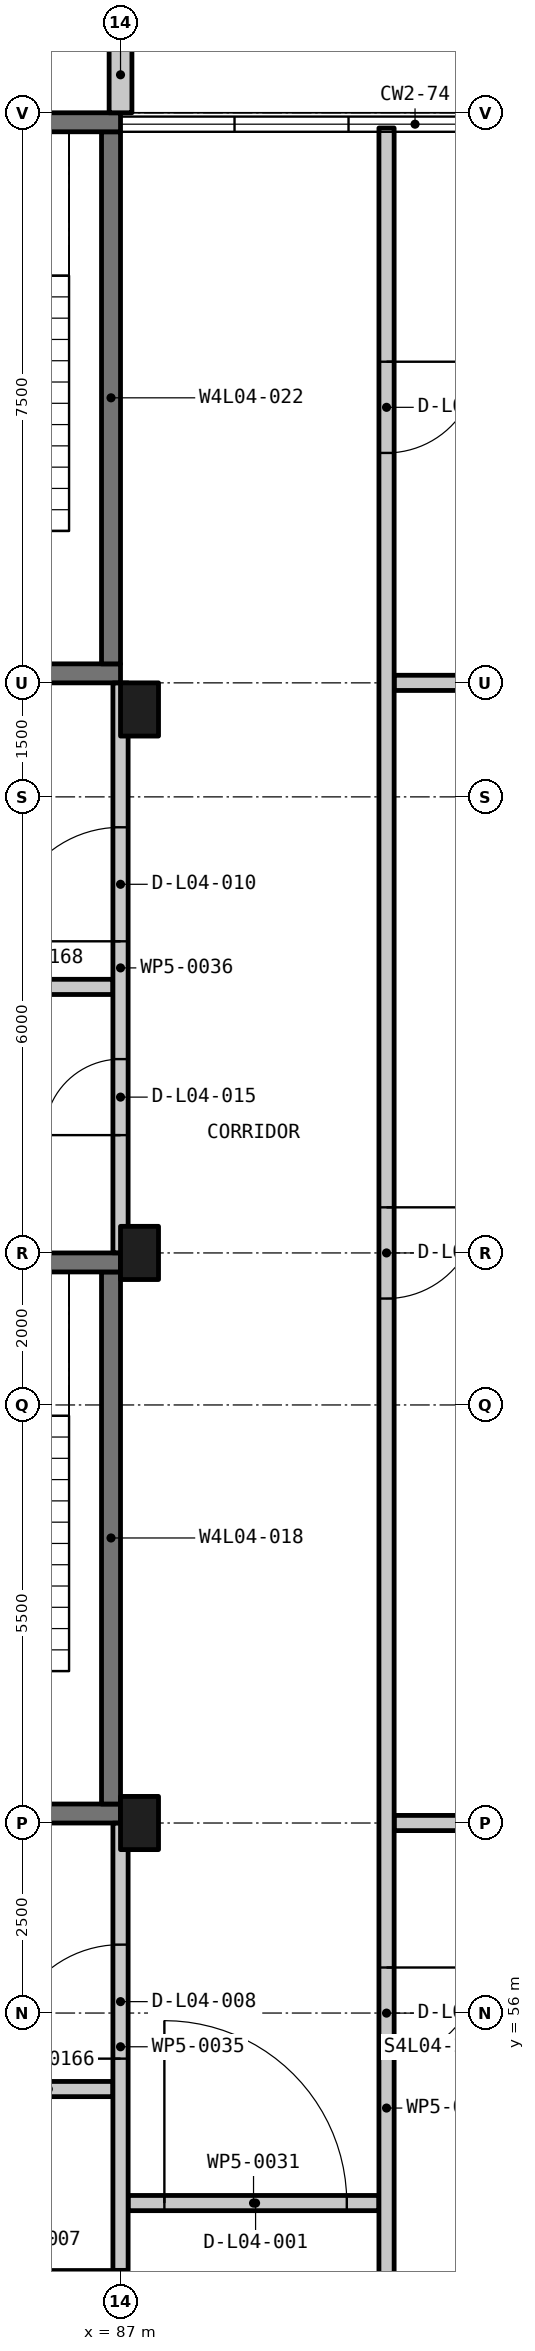
"""IFC4 building model, lengths in metres.
Left out: names, types, materials, properties, quantities, classifications, styles, units other than length and angle.
Written with IfcOpenShell. Run it as: python <this file> out.ifc"""

import sys

from ifc_helpers import new_model, si_unit, direction, frame, frame_2d, origin, origin_2d, place, context, subcontext, project, spatial, rectangle, extrude, element, fill, save


model = new_model("IFC4")
c1 = context("Model", 3, precision=1e-05, world=origin(), true_north=direction((0.0, 1.0)))
c2 = subcontext(c1, "Body", "Model", "MODEL_VIEW")
j1 = project(units=[si_unit("LENGTHUNIT", "METRE"), si_unit("PLANEANGLEUNIT", "RADIAN")], contexts=[c1])
p1 = place(None, origin())
s1 = spatial("IfcSite", under=j1, at=p1, CompositionType="ELEMENT")
p2 = place(p1, origin())
s2 = spatial("IfcBuilding", under=s1, at=p2, CompositionType="ELEMENT")
p3 = place(p2, frame((0.0, 0.0, 20.25)))
s3 = spatial("IfcBuildingStorey", under=s2, at=p3, CompositionType="ELEMENT", Elevation=20.25)
for number, where, z_axis, x_axis in (
    (1, (87.25, 58.5, -0.3), (0.0, 0.0, 1.0), (1.0, 0.0, 0.0)),
    (2, (87.25, 66.0, -0.3), (0.0, 0.0, 1.0), (1.0, 0.0, 0.0)),
    (3, (87.25, 73.15, -0.3), (0.0, 0.0, 1.0), (1.0, 0.0, 0.0)),
):
    element("IfcColumn", number, at=place(p3, frame(where, z_axis=z_axis, x_axis=x_axis)), inside=s3, PredefinedType="COLUMN", context=c2, shape_type="SweptSolid", body=[
        extrude(rectangle(XDim=0.5, YDim=0.7, at=origin_2d()), origin(), (0.0, 0.0, 1.0), 4.5),
    ])
p4 = place(p3, frame((84.577, 52.488, -0.3), z_axis=(0.0, 0.0, 1.0), x_axis=(1.0, 0.0, 0.0)))
e4 = element("IfcWall", 4, at=p4, inside=s3, PredefinedType="SHEAR", context=c2, shape_type="SweptSolid", body=[
    extrude(rectangle(XDim=2.425, YDim=0.25, at=frame_2d((1.212, 0.0))), origin(), (0.0, 0.0, 1.0), 4.5),
])
p5 = place(p3, frame((82.0, 58.625, -0.3), z_axis=(0.0, 0.0, 1.0), x_axis=(1.0, 0.0, 0.0)))
e5 = element("IfcWall", 5, at=p5, inside=s3, PredefinedType="SHEAR", context=c2, shape_type="SweptSolid", body=[
    extrude(rectangle(XDim=5.0, YDim=0.25, at=frame_2d((2.5, 0.0))), origin(), (0.0, 0.0, 1.0), 4.5),
])
p6 = place(p5, frame((1.9, 0.0, 0.3)))
e6 = element("IfcOpeningElement", 6, at=p6, cuts=e5, PredefinedType="OPENING", context=c2, shape_type="SweptSolid", body=[
    extrude(rectangle(XDim=1.2, YDim=2.2, at=frame_2d((0.6, 1.1))), frame((0.0, 0.135, 0.0), z_axis=(0.0, -1.0, 0.0), x_axis=(1.0, 0.0, 0.0)), (0.0, 0.0, 1.0), 0.27),
])
p7 = place(p3, frame((86.875, 58.75, -0.3), z_axis=(0.0, 0.0, 1.0), x_axis=(0.0, 1.0, 0.0)))
e7 = element("IfcWall", 7, at=p7, inside=s3, PredefinedType="SHEAR", context=c2, shape_type="SweptSolid", body=[
    extrude(rectangle(XDim=7.0, YDim=0.25, at=frame_2d((3.5, 0.0))), origin(), (0.0, 0.0, 1.0), 4.5),
])
p8 = place(p3, frame((82.0, 65.875, -0.3), z_axis=(0.0, 0.0, 1.0), x_axis=(1.0, 0.0, 0.0)))
e8 = element("IfcWall", 8, at=p8, inside=s3, PredefinedType="SHEAR", context=c2, shape_type="SweptSolid", body=[
    extrude(rectangle(XDim=5.0, YDim=0.25, at=frame_2d((2.5, 0.0))), origin(), (0.0, 0.0, 1.0), 4.5),
])
p9 = place(p3, frame((82.0, 73.625, -0.3), z_axis=(0.0, 0.0, 1.0), x_axis=(1.0, 0.0, 0.0)))
e9 = element("IfcWall", 9, at=p9, inside=s3, PredefinedType="SHEAR", context=c2, shape_type="SweptSolid", body=[
    extrude(rectangle(XDim=5.0, YDim=0.25, at=frame_2d((2.5, 0.0))), origin(), (0.0, 0.0, 1.0), 4.5),
])
p10 = place(p9, frame((1.9, 0.0, 0.3)))
e10 = element("IfcOpeningElement", 10, at=p10, cuts=e9, PredefinedType="OPENING", context=c2, shape_type="SweptSolid", body=[
    extrude(rectangle(XDim=1.2, YDim=2.2, at=frame_2d((0.6, 1.1))), frame((0.0, 0.135, 0.0), z_axis=(0.0, -1.0, 0.0), x_axis=(1.0, 0.0, 0.0)), (0.0, 0.0, 1.0), 0.27),
])
p11 = place(p3, frame((86.875, 73.75, -0.3), z_axis=(0.0, 0.0, 1.0), x_axis=(0.0, 1.0, 0.0)))
e11 = element("IfcWall", 11, at=p11, inside=s3, PredefinedType="SHEAR", context=c2, shape_type="SweptSolid", body=[
    extrude(rectangle(XDim=7.0, YDim=0.25, at=frame_2d((3.5, 0.0))), origin(), (0.0, 0.0, 1.0), 4.5),
])
p12 = place(p3, frame((82.0, 80.875, -0.3), z_axis=(0.0, 0.0, 1.0), x_axis=(1.0, 0.0, 0.0)))
e12 = element("IfcWall", 12, at=p12, inside=s3, PredefinedType="SHEAR", context=c2, shape_type="SweptSolid", body=[
    extrude(rectangle(XDim=5.0, YDim=0.25, at=frame_2d((2.5, 0.0))), origin(), (0.0, 0.0, 1.0), 4.5),
])
p13 = place(p3, frame((87.0, 81.0, 0.0), z_axis=(0.0, 0.0, 1.0), x_axis=(0.0, 1.0, 0.0)))
e13 = element("IfcWall", 13, at=p13, inside=s3, PredefinedType="SOLIDWALL", context=c2, shape_type="SweptSolid", body=[
    extrude(rectangle(XDim=1.0, YDim=0.3, at=frame_2d((0.5, 0.0))), origin(), (0.0, 0.0, 1.0), 4.5),
])
p14 = place(p3, frame((87.1, 53.5, 0.0), z_axis=(0.0, 0.0, 1.0), x_axis=(1.0, 0.0, 0.0)))
e14 = element("IfcWall", 14, at=p14, inside=s3, PredefinedType="PARTITIONING", context=c2, shape_type="SweptSolid", body=[
    extrude(rectangle(XDim=3.3, YDim=0.2, at=frame_2d((1.65, 0.0))), origin(), (0.0, 0.0, 1.0), 3.4),
])
p15 = place(p14, frame((0.477, 0.0, 0.0)))
e15 = element("IfcOpeningElement", 15, at=p15, cuts=e14, PredefinedType="OPENING", context=c2, shape_type="SweptSolid", body=[
    extrude(rectangle(XDim=2.4, YDim=2.1, at=frame_2d((1.2, 1.05))), frame((0.0, 0.11, 0.0), z_axis=(0.0, -1.0, 0.0), x_axis=(1.0, 0.0, 0.0)), (0.0, 0.0, 1.0), 0.22),
])
p16 = place(p3, frame((85.2, 55.0, 0.0), z_axis=(0.0, 0.0, 1.0), x_axis=(1.0, 0.0, 0.0)))
e16 = element("IfcWall", 16, at=p16, inside=s3, PredefinedType="PARTITIONING", context=c2, shape_type="SweptSolid", body=[
    extrude(rectangle(XDim=1.7, YDim=0.2, at=frame_2d((0.85, 0.0))), origin(), (0.0, 0.0, 1.0), 3.6),
])
p17 = place(p3, frame((90.6, 58.5, 0.0), z_axis=(0.0, 0.0, 1.0), x_axis=(1.0, 0.0, 0.0)))
e17 = element("IfcWall", 17, at=p17, inside=s3, PredefinedType="PARTITIONING", context=c2, shape_type="SweptSolid", body=[
    extrude(rectangle(XDim=13.2, YDim=0.2, at=frame_2d((6.6, 0.0))), origin(), (0.0, 0.0, 1.0), 3.3),
])
p18 = place(p3, frame((84.9, 69.5, 0.0), z_axis=(0.0, 0.0, 1.0), x_axis=(1.0, 0.0, 0.0)))
e18 = element("IfcWall", 18, at=p18, inside=s3, PredefinedType="PARTITIONING", context=c2, shape_type="SweptSolid", body=[
    extrude(rectangle(XDim=2.0, YDim=0.2, at=frame_2d((1.0, 0.0))), origin(), (0.0, 0.0, 1.0), 3.6),
])
p19 = place(p3, frame((90.6, 73.5, 0.0), z_axis=(0.0, 0.0, 1.0), x_axis=(1.0, 0.0, 0.0)))
e19 = element("IfcWall", 19, at=p19, inside=s3, PredefinedType="PARTITIONING", context=c2, shape_type="SweptSolid", body=[
    extrude(rectangle(XDim=12.998, YDim=0.2, at=frame_2d((6.499, 0.0))), origin(), (0.0, 0.0, 1.0), 3.4),
])
p20 = place(p3, frame((90.5, 80.8, 0.0), z_axis=(0.0, 0.0, 1.0), x_axis=(0.0, -1.0, 0.0)))
e20 = element("IfcWall", 20, at=p20, inside=s3, PredefinedType="PARTITIONING", context=c2, shape_type="SweptSolid", body=[
    extrude(rectangle(XDim=52.1, YDim=0.2, at=frame_2d((26.05, 0.0))), origin(), (0.0, 0.0, 1.0), 3.3),
])
p21 = place(p20, frame((47.85, 0.0, 0.0)))
e21 = element("IfcOpeningElement", 21, at=p21, cuts=e20, PredefinedType="OPENING", context=c2, shape_type="SweptSolid", body=[
    extrude(rectangle(XDim=1.2, YDim=2.1, at=frame_2d((0.6, 1.05))), frame((0.0, 0.11, 0.0), z_axis=(0.0, -1.0, 0.0), x_axis=(1.0, 0.0, 0.0)), (0.0, 0.0, 1.0), 0.22),
])
p22 = place(p20, frame((38.949, 0.0, 0.0)))
e22 = element("IfcOpeningElement", 22, at=p22, cuts=e20, PredefinedType="OPENING", context=c2, shape_type="SweptSolid", body=[
    extrude(rectangle(XDim=1.2, YDim=2.1, at=frame_2d((0.6, 1.05))), frame((0.0, 0.11, 0.0), z_axis=(0.0, -1.0, 0.0), x_axis=(1.0, 0.0, 0.0)), (0.0, 0.0, 1.0), 0.22),
])
p23 = place(p20, frame((24.201, 0.0, 0.0)))
e23 = element("IfcOpeningElement", 23, at=p23, cuts=e20, PredefinedType="OPENING", context=c2, shape_type="SweptSolid", body=[
    extrude(rectangle(XDim=1.2, YDim=2.1, at=frame_2d((0.6, 1.05))), frame((0.0, 0.11, 0.0), z_axis=(0.0, -1.0, 0.0), x_axis=(1.0, 0.0, 0.0)), (0.0, 0.0, 1.0), 0.22),
])
p24 = place(p20, frame((14.2, 0.0, 0.0)))
e24 = element("IfcOpeningElement", 24, at=p24, cuts=e20, PredefinedType="OPENING", context=c2, shape_type="SweptSolid", body=[
    extrude(rectangle(XDim=1.2, YDim=2.1, at=frame_2d((0.6, 1.05))), frame((0.0, 0.11, 0.0), z_axis=(0.0, -1.0, 0.0), x_axis=(1.0, 0.0, 0.0)), (0.0, 0.0, 1.0), 0.22),
])
p25 = place(p20, frame((3.075, 0.0, 0.0)))
e25 = element("IfcOpeningElement", 25, at=p25, cuts=e20, PredefinedType="OPENING", context=c2, shape_type="SweptSolid", body=[
    extrude(rectangle(XDim=1.2, YDim=2.1, at=frame_2d((0.6, 1.05))), frame((0.0, 0.11, 0.0), z_axis=(0.0, -1.0, 0.0), x_axis=(1.0, 0.0, 0.0)), (0.0, 0.0, 1.0), 0.22),
])
p26 = place(p3, frame((87.0, 52.615, 0.0), z_axis=(0.0, 0.0, 1.0), x_axis=(0.0, 1.0, 0.0)))
e26 = element("IfcWall", 26, at=p26, inside=s3, PredefinedType="PARTITIONING", context=c2, shape_type="SweptSolid", body=[
    extrude(rectangle(XDim=5.884, YDim=0.2, at=frame_2d((2.942, 0.0))), origin(), (0.0, 0.0, 1.0), 3.4),
])
p27 = place(p26, frame((2.785, 0.0, 0.0)))
e27 = element("IfcOpeningElement", 27, at=p27, cuts=e26, PredefinedType="OPENING", context=c2, shape_type="SweptSolid", body=[
    extrude(rectangle(XDim=1.5, YDim=2.1, at=frame_2d((0.75, 1.05))), frame((0.0, 0.11, 0.0), z_axis=(0.0, -1.0, 0.0), x_axis=(1.0, 0.0, 0.0)), (0.0, 0.0, 1.0), 0.22),
])
p28 = place(p3, frame((87.0, 66.002, 0.0), z_axis=(0.0, 0.0, 1.0), x_axis=(0.0, 1.0, 0.0)))
e28 = element("IfcWall", 28, at=p28, inside=s3, PredefinedType="PARTITIONING", context=c2, shape_type="SweptSolid", body=[
    extrude(rectangle(XDim=7.496, YDim=0.2, at=frame_2d((3.748, 0.0))), origin(), (0.0, 0.0, 1.0), 3.4),
])
p29 = place(p28, frame((4.098, 0.0, 0.0)))
e29 = element("IfcOpeningElement", 29, at=p29, cuts=e28, PredefinedType="OPENING", context=c2, shape_type="SweptSolid", body=[
    extrude(rectangle(XDim=1.5, YDim=2.1, at=frame_2d((0.75, 1.05))), frame((0.0, 0.11, 0.0), z_axis=(0.0, -1.0, 0.0), x_axis=(1.0, 0.0, 0.0)), (0.0, 0.0, 1.0), 0.22),
])
p30 = place(p28, frame((1.548, 0.0, 0.0)))
e30 = element("IfcOpeningElement", 30, at=p30, cuts=e28, PredefinedType="OPENING", context=c2, shape_type="SweptSolid", body=[
    extrude(rectangle(XDim=1.0, YDim=2.1, at=frame_2d((0.5, 1.05))), frame((0.0, 0.11, 0.0), z_axis=(0.0, -1.0, 0.0), x_axis=(1.0, 0.0, 0.0)), (0.0, 0.0, 1.0), 0.22),
])
p31 = place(p15, origin())
e31 = element("IfcDoor", 31, at=p31, inside=s3, OperationType="DOUBLE_DOOR_SINGLE_SWING", PredefinedType="DOOR", context=c2, shape_type="SweptSolid", body=[
    extrude(rectangle(XDim=2.4, YDim=2.1, at=frame_2d((1.2, 1.05))), frame((0.0, 0.025, 0.0), z_axis=(0.0, -1.0, 0.0), x_axis=(1.0, 0.0, 0.0)), (0.0, 0.0, 1.0), 0.05),
])
fill(e15, e31)
p32 = place(p27, origin())
e32 = element("IfcDoor", 32, at=p32, inside=s3, OperationType="DOUBLE_DOOR_SINGLE_SWING", PredefinedType="DOOR", context=c2, shape_type="SweptSolid", body=[
    extrude(rectangle(XDim=1.5, YDim=2.1, at=frame_2d((0.75, 1.05))), frame((0.0, 0.025, 0.0), z_axis=(0.0, -1.0, 0.0), x_axis=(1.0, 0.0, 0.0)), (0.0, 0.0, 1.0), 0.05),
])
fill(e27, e32)
p33 = place(p29, origin())
e33 = element("IfcDoor", 33, at=p33, inside=s3, OperationType="DOUBLE_DOOR_SINGLE_SWING", PredefinedType="DOOR", context=c2, shape_type="SweptSolid", body=[
    extrude(rectangle(XDim=1.5, YDim=2.1, at=frame_2d((0.75, 1.05))), frame((0.0, 0.025, 0.0), z_axis=(0.0, -1.0, 0.0), x_axis=(1.0, 0.0, 0.0)), (0.0, 0.0, 1.0), 0.05),
])
fill(e29, e33)
p34 = place(p30, origin())
e34 = element("IfcDoor", 34, at=p34, inside=s3, OperationType="SINGLE_SWING_RIGHT", PredefinedType="DOOR", context=c2, shape_type="SweptSolid", body=[
    extrude(rectangle(XDim=1.0, YDim=2.1, at=frame_2d((0.5, 1.05))), frame((0.0, 0.025, 0.0), z_axis=(0.0, -1.0, 0.0), x_axis=(1.0, 0.0, 0.0)), (0.0, 0.0, 1.0), 0.05),
])
fill(e30, e34)
p35 = place(p23, origin())
e35 = element("IfcDoor", 35, at=p35, inside=s3, OperationType="SINGLE_SWING_RIGHT", PredefinedType="DOOR", context=c2, shape_type="SweptSolid", body=[
    extrude(rectangle(XDim=1.2, YDim=2.1, at=frame_2d((0.6, 1.05))), frame((0.0, 0.025, 0.0), z_axis=(0.0, -1.0, 0.0), x_axis=(1.0, 0.0, 0.0)), (0.0, 0.0, 1.0), 0.05),
])
fill(e23, e35)
p36 = place(p24, origin())
e36 = element("IfcDoor", 36, at=p36, inside=s3, OperationType="SINGLE_SWING_RIGHT", PredefinedType="DOOR", context=c2, shape_type="SweptSolid", body=[
    extrude(rectangle(XDim=1.2, YDim=2.1, at=frame_2d((0.6, 1.05))), frame((0.0, 0.025, 0.0), z_axis=(0.0, -1.0, 0.0), x_axis=(1.0, 0.0, 0.0)), (0.0, 0.0, 1.0), 0.05),
])
fill(e24, e36)
p37 = place(p25, origin())
e37 = element("IfcDoor", 37, at=p37, inside=s3, OperationType="SINGLE_SWING_RIGHT", PredefinedType="DOOR", context=c2, shape_type="SweptSolid", body=[
    extrude(rectangle(XDim=1.2, YDim=2.1, at=frame_2d((0.6, 1.05))), frame((0.0, 0.025, 0.0), z_axis=(0.0, -1.0, 0.0), x_axis=(1.0, 0.0, 0.0)), (0.0, 0.0, 1.0), 0.05),
])
fill(e25, e37)
save(model, sys.argv[1])
